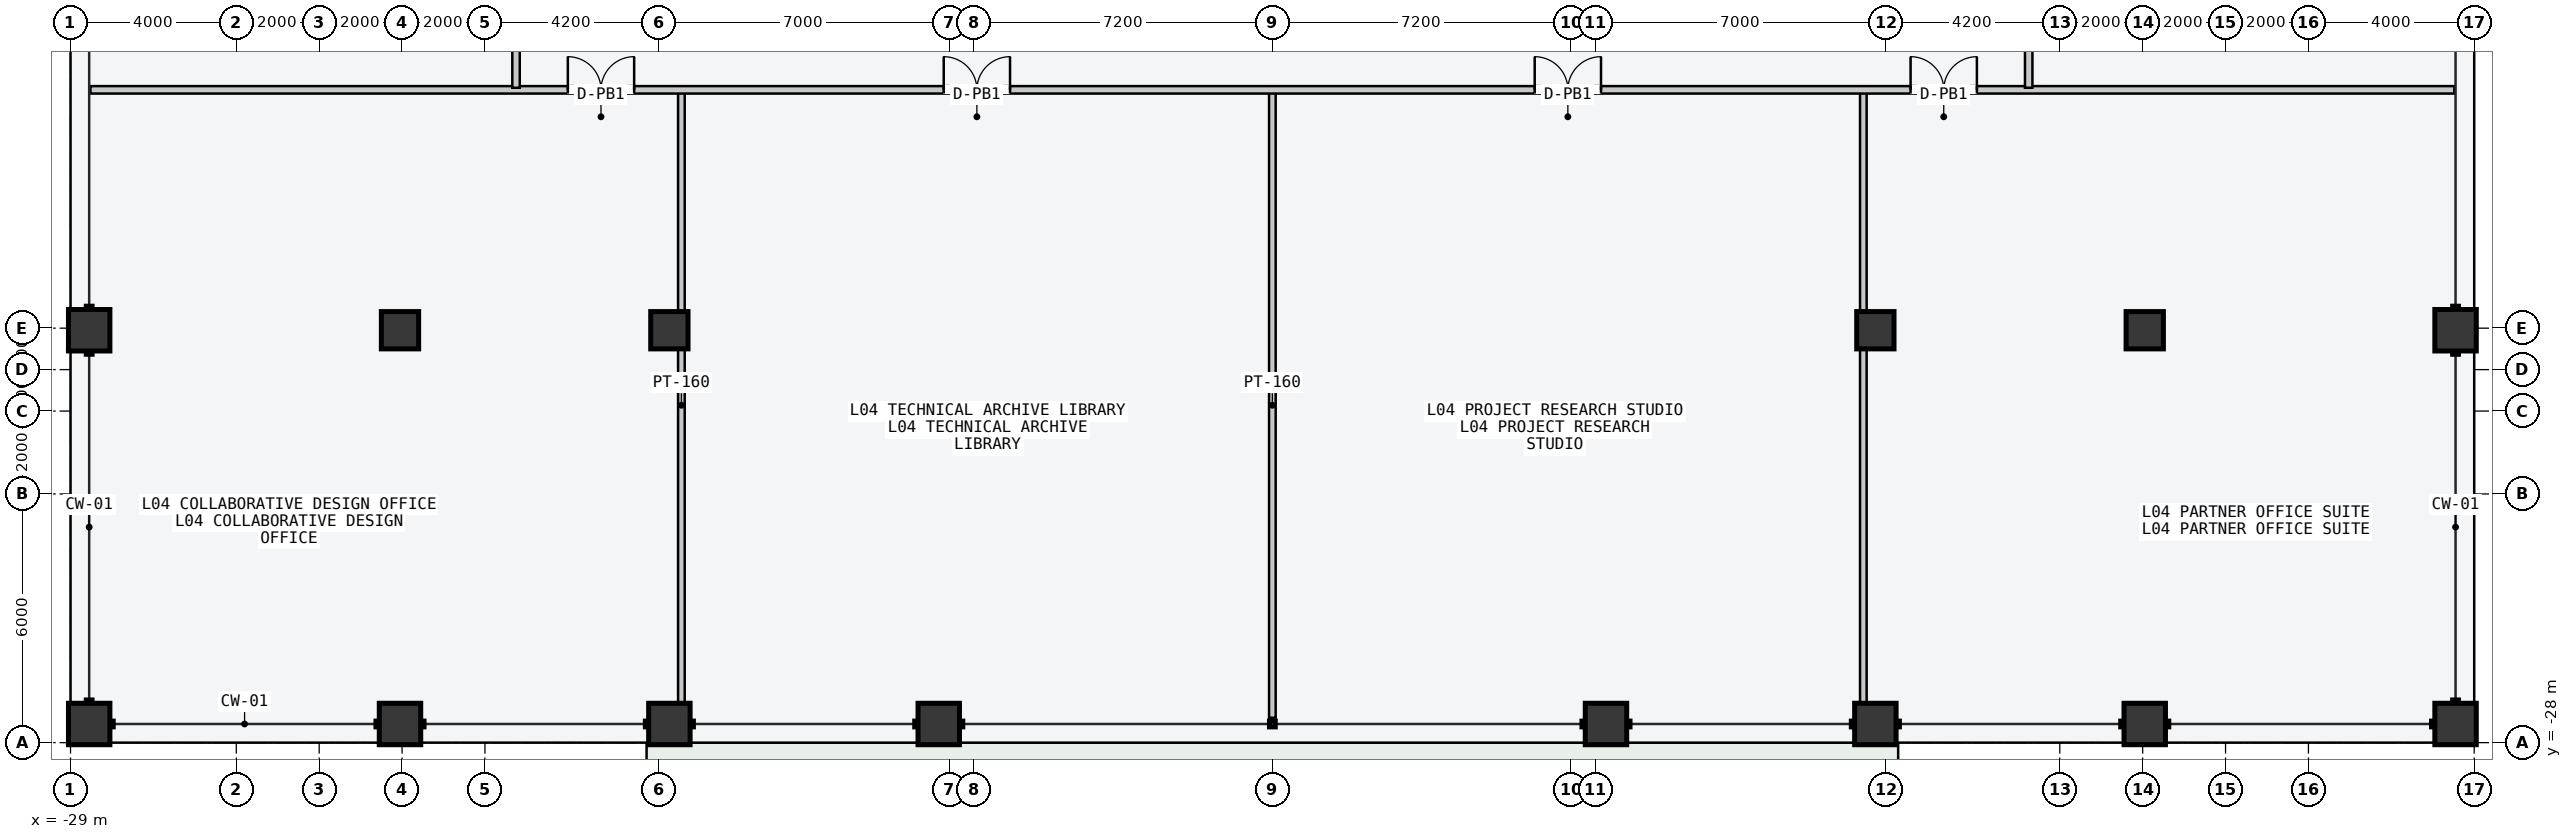
"""IFC4 building model, lengths in metres.
Left out: names, types, materials, properties, quantities, classifications, styles, units other than length and angle.
Written with IfcOpenShell. Run it as: python <this file> out.ifc"""

import sys

from ifc_helpers import new_model, si_unit, direction, frame, frame_2d, origin, origin_2d, place, context, subcontext, project, spatial, rectangle, hollow_rectangle, extrude, element, fill, save


model = new_model("IFC4")
c1 = context("Model", 3, precision=1e-05, world=origin(), true_north=direction((0.0, 1.0)))
c2 = subcontext(c1, "Body", "Model", "MODEL_VIEW")
j1 = project(units=[si_unit("LENGTHUNIT", "METRE"), si_unit("PLANEANGLEUNIT", "RADIAN")], contexts=[c1])
p1 = place(None, origin())
s1 = spatial("IfcSite", under=j1, at=p1, CompositionType="ELEMENT")
p2 = place(p1, origin())
s2 = spatial("IfcBuilding", under=s1, at=p2, CompositionType="ELEMENT")
p3 = place(p2, frame((0.0, 0.0, 19.2)))
s3 = spatial("IfcBuildingStorey", under=s2, at=p3, CompositionType="ELEMENT", Elevation=19.2)
for number, where, z_axis, x_axis in (
    (1, (-21.05, -18.05, 0.0), (0.0, 0.0, 1.0), (1.0, 0.0, 0.0)),
    (2, (-14.55, -18.05, 0.0), (0.0, 0.0, 1.0), (1.0, 0.0, 0.0)),
    (3, (14.55, -18.05, 0.0), (0.0, 0.0, 1.0), (1.0, 0.0, 0.0)),
    (4, (21.05, -18.05, 0.0), (0.0, 0.0, 1.0), (1.0, 0.0, 0.0)),
):
    element("IfcColumn", number, at=place(p3, frame(where, z_axis=z_axis, x_axis=x_axis)), inside=s3, PredefinedType="COLUMN", context=c2, shape_type="SweptSolid", body=[
        extrude(hollow_rectangle(XDim=0.9, YDim=0.9, WallThickness=0.045, at=origin_2d()), origin(), (0.0, 0.0, 1.0), 4.8),
    ])
for number, where, z_axis, x_axis in (
    (5, (-28.55, -27.55, 0.0), (0.0, 0.0, 1.0), (1.0, 0.0, 0.0)),
    (6, (-21.05, -27.55, 0.0), (0.0, 0.0, 1.0), (1.0, 0.0, 0.0)),
    (7, (-14.55, -27.55, 0.0), (0.0, 0.0, 1.0), (1.0, 0.0, 0.0)),
    (8, (-8.05, -27.55, 0.0), (0.0, 0.0, 1.0), (1.0, 0.0, 0.0)),
    (9, (8.05, -27.55, 0.0), (0.0, 0.0, 1.0), (1.0, 0.0, 0.0)),
    (10, (14.55, -27.55, 0.0), (0.0, 0.0, 1.0), (1.0, 0.0, 0.0)),
    (11, (21.05, -27.55, 0.0), (0.0, 0.0, 1.0), (1.0, 0.0, 0.0)),
    (12, (28.55, -27.55, 0.0), (0.0, 0.0, 1.0), (1.0, 0.0, 0.0)),
    (13, (-28.55, -18.05, 0.0), (0.0, 0.0, 1.0), (0.0, 1.0, 0.0)),
    (14, (28.55, -18.05, 0.0), (0.0, 0.0, 1.0), (0.0, 1.0, 0.0)),
):
    element("IfcColumn", number, at=place(p3, frame(where, z_axis=z_axis, x_axis=x_axis)), inside=s3, PredefinedType="COLUMN", context=c2, shape_type="SweptSolid", body=[
        extrude(hollow_rectangle(XDim=1.0, YDim=1.0, WallThickness=0.05, at=origin_2d()), origin(), (0.0, 0.0, 1.0), 4.8),
    ])
p4 = place(p3, frame((-14.26, -27.4, 0.0), z_axis=(0.0, 0.0, 1.0), x_axis=(0.0, 1.0, 0.0)))
e15 = element("IfcWall", 15, at=p4, inside=s3, PredefinedType="PARTITIONING", context=c2, shape_type="SweptSolid", body=[
    extrude(rectangle(XDim=15.08, YDim=0.16, at=frame_2d((7.54, 0.0))), origin(), (0.0, 0.0, 1.0), 2.92),
])
p5 = place(p3, frame((0.0, -27.4, 0.0), z_axis=(0.0, 0.0, 1.0), x_axis=(0.0, 1.0, 0.0)))
e16 = element("IfcWall", 16, at=p5, inside=s3, PredefinedType="PARTITIONING", context=c2, shape_type="SweptSolid", body=[
    extrude(rectangle(XDim=15.08, YDim=0.16, at=frame_2d((7.54, 0.0))), origin(), (0.0, 0.0, 1.0), 4.6),
])
p6 = place(p3, frame((14.26, -27.4, 0.0), z_axis=(0.0, 0.0, 1.0), x_axis=(0.0, 1.0, 0.0)))
e17 = element("IfcWall", 17, at=p6, inside=s3, PredefinedType="PARTITIONING", context=c2, shape_type="SweptSolid", body=[
    extrude(rectangle(XDim=15.08, YDim=0.16, at=frame_2d((7.54, 0.0))), origin(), (0.0, 0.0, 1.0), 2.92),
])
p7 = place(p3, frame((-28.52, -12.25, 0.0), z_axis=(0.0, 0.0, 1.0), x_axis=(1.0, 0.0, 0.0)))
e18 = element("IfcWall", 18, at=p7, inside=s3, PredefinedType="PARTITIONING", context=c2, shape_type="SweptSolid", body=[
    extrude(rectangle(XDim=57.04, YDim=0.18, at=frame_2d((28.52, 0.0))), origin(), (0.0, 0.0, 1.0), 4.6),
])
p8 = place(p7, frame((11.52, 0.0, 0.0)))
e19 = element("IfcOpeningElement", 19, at=p8, cuts=e18, PredefinedType="OPENING", context=c2, shape_type="SweptSolid", body=[
    extrude(rectangle(XDim=1.6, YDim=2.3, at=frame_2d((0.8, 1.15))), frame((0.0, 0.1, 0.0), z_axis=(0.0, -1.0, 0.0), x_axis=(1.0, 0.0, 0.0)), (0.0, 0.0, 1.0), 0.2),
])
p9 = place(p7, frame((20.59, 0.0, 0.0)))
e20 = element("IfcOpeningElement", 20, at=p9, cuts=e18, PredefinedType="OPENING", context=c2, shape_type="SweptSolid", body=[
    extrude(rectangle(XDim=1.6, YDim=2.3, at=frame_2d((0.8, 1.15))), frame((0.0, 0.1, 0.0), z_axis=(0.0, -1.0, 0.0), x_axis=(1.0, 0.0, 0.0)), (0.0, 0.0, 1.0), 0.2),
])
p10 = place(p7, frame((34.85, 0.0, 0.0)))
e21 = element("IfcOpeningElement", 21, at=p10, cuts=e18, PredefinedType="OPENING", context=c2, shape_type="SweptSolid", body=[
    extrude(rectangle(XDim=1.6, YDim=2.3, at=frame_2d((0.8, 1.15))), frame((0.0, 0.1, 0.0), z_axis=(0.0, -1.0, 0.0), x_axis=(1.0, 0.0, 0.0)), (0.0, 0.0, 1.0), 0.2),
])
p11 = place(p7, frame((43.92, 0.0, 0.0)))
e22 = element("IfcOpeningElement", 22, at=p11, cuts=e18, PredefinedType="OPENING", context=c2, shape_type="SweptSolid", body=[
    extrude(rectangle(XDim=1.6, YDim=2.3, at=frame_2d((0.8, 1.15))), frame((0.0, 0.1, 0.0), z_axis=(0.0, -1.0, 0.0), x_axis=(1.0, 0.0, 0.0)), (0.0, 0.0, 1.0), 0.2),
])
p12 = place(p3, frame((-18.25, -12.2, 0.0), z_axis=(0.0, 0.0, 1.0), x_axis=(0.0, 1.0, 0.0)))
e23 = element("IfcWall", 23, at=p12, inside=s3, PredefinedType="PARTITIONING", context=c2, shape_type="SweptSolid", body=[
    extrude(rectangle(XDim=28.9, YDim=0.18, at=frame_2d((14.45, 0.0))), origin(), (0.0, 0.0, 1.0), 4.6),
])
p13 = place(p12, frame((13.0, 0.0, 0.0)))
e24 = element("IfcOpeningElement", 24, at=p13, cuts=e23, PredefinedType="OPENING", context=c2, shape_type="SweptSolid", body=[
    extrude(rectangle(XDim=1.6, YDim=2.3, at=frame_2d((0.8, 1.15))), frame((0.0, 0.1, 0.0), z_axis=(0.0, -1.0, 0.0), x_axis=(1.0, 0.0, 0.0)), (0.0, 0.0, 1.0), 0.2),
])
p14 = place(p3, frame((18.25, -12.2, 0.0), z_axis=(0.0, 0.0, 1.0), x_axis=(0.0, 1.0, 0.0)))
e25 = element("IfcWall", 25, at=p14, inside=s3, PredefinedType="PARTITIONING", context=c2, shape_type="SweptSolid", body=[
    extrude(rectangle(XDim=28.9, YDim=0.18, at=frame_2d((14.45, 0.0))), origin(), (0.0, 0.0, 1.0), 4.6),
])
p15 = place(p14, frame((13.0, 0.0, 0.0)))
e26 = element("IfcOpeningElement", 26, at=p15, cuts=e25, PredefinedType="OPENING", context=c2, shape_type="SweptSolid", body=[
    extrude(rectangle(XDim=1.6, YDim=2.3, at=frame_2d((0.8, 1.15))), frame((0.0, 0.1, 0.0), z_axis=(0.0, -1.0, 0.0), x_axis=(1.0, 0.0, 0.0)), (0.0, 0.0, 1.0), 0.2),
])
p16 = place(p8, origin())
e27 = element("IfcDoor", 27, at=p16, inside=s3, OperationType="DOUBLE_DOOR_SINGLE_SWING", PredefinedType="DOOR", context=c2, shape_type="SweptSolid", body=[
    extrude(rectangle(XDim=1.6, YDim=2.3, at=frame_2d((0.8, 1.15))), frame((0.0, 0.025, 0.0), z_axis=(0.0, -1.0, 0.0), x_axis=(1.0, 0.0, 0.0)), (0.0, 0.0, 1.0), 0.05),
])
fill(e19, e27)
p17 = place(p9, origin())
e28 = element("IfcDoor", 28, at=p17, inside=s3, OperationType="DOUBLE_DOOR_SINGLE_SWING", PredefinedType="DOOR", context=c2, shape_type="SweptSolid", body=[
    extrude(rectangle(XDim=1.6, YDim=2.3, at=frame_2d((0.8, 1.15))), frame((0.0, 0.025, 0.0), z_axis=(0.0, -1.0, 0.0), x_axis=(1.0, 0.0, 0.0)), (0.0, 0.0, 1.0), 0.05),
])
fill(e20, e28)
p18 = place(p10, origin())
e29 = element("IfcDoor", 29, at=p18, inside=s3, OperationType="DOUBLE_DOOR_SINGLE_SWING", PredefinedType="DOOR", context=c2, shape_type="SweptSolid", body=[
    extrude(rectangle(XDim=1.6, YDim=2.3, at=frame_2d((0.8, 1.15))), frame((0.0, 0.025, 0.0), z_axis=(0.0, -1.0, 0.0), x_axis=(1.0, 0.0, 0.0)), (0.0, 0.0, 1.0), 0.05),
])
fill(e21, e29)
p19 = place(p11, origin())
e30 = element("IfcDoor", 30, at=p19, inside=s3, OperationType="DOUBLE_DOOR_SINGLE_SWING", PredefinedType="DOOR", context=c2, shape_type="SweptSolid", body=[
    extrude(rectangle(XDim=1.6, YDim=2.3, at=frame_2d((0.8, 1.15))), frame((0.0, 0.025, 0.0), z_axis=(0.0, -1.0, 0.0), x_axis=(1.0, 0.0, 0.0)), (0.0, 0.0, 1.0), 0.05),
])
fill(e22, e30)
save(model, sys.argv[1])
